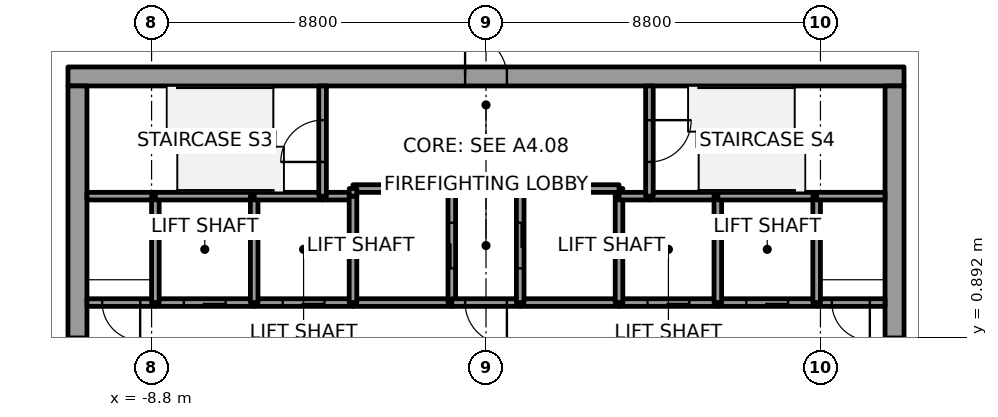
"""IFC4 building model, lengths in metres.
Left out: names, types, materials, properties, quantities, classifications, styles, units other than length and angle.
Written with IfcOpenShell. Run it as: python <this file> out.ifc"""

import sys

from ifc_helpers import new_model, si_unit, direction, frame, frame_2d, origin, place, context, subcontext, project, spatial, rectangle, extrude, element, fill, save


model = new_model("IFC4")
c1 = context("Model", 3, precision=1e-05, world=origin(), true_north=direction((0.0, 1.0)))
c2 = subcontext(c1, "Body", "Model", "MODEL_VIEW")
j1 = project(units=[si_unit("LENGTHUNIT", "METRE"), si_unit("PLANEANGLEUNIT", "RADIAN")], contexts=[c1])
p1 = place(None, origin())
s1 = spatial("IfcSite", under=j1, at=p1, CompositionType="ELEMENT")
p2 = place(p1, origin())
s2 = spatial("IfcBuilding", under=s1, at=p2, CompositionType="ELEMENT")
p3 = place(p2, frame((0.0, 0.0, 40.8)))
s3 = spatial("IfcBuildingStorey", under=s2, at=p3, CompositionType="ELEMENT", Elevation=40.8)
p4 = place(p3, frame((-11.0, 7.75, 0.0), z_axis=(0.0, 0.0, 1.0), x_axis=(1.0, 0.0, 0.0)))
e1 = element("IfcWall", 1, at=p4, inside=s3, PredefinedType="SHEAR", context=c2, shape_type="SweptSolid", body=[
    extrude(rectangle(XDim=22.0, YDim=0.5, at=frame_2d((11.0, 0.0))), origin(), (0.0, 0.0, 1.0), 7.2),
])
p5 = place(p4, frame((10.45, 0.0, 0.0)))
e2 = element("IfcOpeningElement", 2, at=p5, cuts=e1, PredefinedType="OPENING", context=c2, shape_type="SweptSolid", body=[
    extrude(rectangle(XDim=1.1, YDim=2.1, at=frame_2d((0.55, 1.05))), frame((0.0, 0.25, 0.0), z_axis=(0.0, -1.0, 0.0), x_axis=(1.0, 0.0, 0.0)), (0.0, 0.0, 1.0), 0.5),
])
p6 = place(p3, frame((-10.75, -7.5, 0.0), z_axis=(0.0, 0.0, 1.0), x_axis=(0.0, 1.0, 0.0)))
e3 = element("IfcWall", 3, at=p6, inside=s3, PredefinedType="SHEAR", context=c2, shape_type="SweptSolid", body=[
    extrude(rectangle(XDim=15.0, YDim=0.5, at=frame_2d((7.5, 0.0))), origin(), (0.0, 0.0, 1.0), 7.2),
])
p7 = place(p6, frame((6.6, 0.0, 0.0)))
e4 = element("IfcOpeningElement", 4, at=p7, cuts=e3, PredefinedType="OPENING", context=c2, shape_type="SweptSolid", body=[
    extrude(rectangle(XDim=1.8, YDim=2.1, at=frame_2d((0.9, 1.05))), frame((0.0, 0.25, 0.0), z_axis=(0.0, -1.0, 0.0), x_axis=(1.0, 0.0, 0.0)), (0.0, 0.0, 1.0), 0.5),
])
p8 = place(p3, frame((10.75, -7.5, 0.0), z_axis=(0.0, 0.0, 1.0), x_axis=(0.0, 1.0, 0.0)))
e5 = element("IfcWall", 5, at=p8, inside=s3, PredefinedType="SHEAR", context=c2, shape_type="SweptSolid", body=[
    extrude(rectangle(XDim=15.0, YDim=0.5, at=frame_2d((7.5, 0.0))), origin(), (0.0, 0.0, 1.0), 7.2),
])
p9 = place(p8, frame((6.6, 0.0, 0.0)))
e6 = element("IfcOpeningElement", 6, at=p9, cuts=e5, PredefinedType="OPENING", context=c2, shape_type="SweptSolid", body=[
    extrude(rectangle(XDim=1.8, YDim=2.1, at=frame_2d((0.9, 1.05))), frame((0.0, 0.25, 0.0), z_axis=(0.0, -1.0, 0.0), x_axis=(1.0, 0.0, 0.0)), (0.0, 0.0, 1.0), 0.5),
])
p10 = place(p3, frame((-8.7, 1.8, 0.0), z_axis=(0.0, 0.0, 1.0), x_axis=(-1.0, 0.0, 0.0)))
e7 = element("IfcWall", 7, at=p10, inside=s3, PredefinedType="SOLIDWALL", context=c2, shape_type="SweptSolid", body=[
    extrude(rectangle(XDim=1.8, YDim=0.2, at=frame_2d((0.9, 0.0))), origin(), (0.0, 0.0, 1.0), 7.05),
])
p11 = place(p10, frame((0.4, 0.0, 0.0)))
e8 = element("IfcOpeningElement", 8, at=p11, cuts=e7, PredefinedType="OPENING", context=c2, shape_type="SweptSolid", body=[
    extrude(rectangle(XDim=1.0, YDim=2.1, at=frame_2d((0.5, 1.05))), frame((0.0, 0.1, 0.0), z_axis=(0.0, -1.0, 0.0), x_axis=(1.0, 0.0, 0.0)), (0.0, 0.0, 1.0), 0.2),
])
p12 = place(p3, frame((-8.7, 4.6, 0.0), z_axis=(0.0, 0.0, 1.0), x_axis=(-1.0, 0.0, 0.0)))
e9 = element("IfcWall", 9, at=p12, inside=s3, PredefinedType="SOLIDWALL", context=c2, shape_type="SweptSolid", body=[
    extrude(rectangle(XDim=1.8, YDim=0.2, at=frame_2d((0.9, 0.0))), origin(), (0.0, 0.0, 1.0), 7.05),
])
p13 = place(p3, frame((-6.1, 1.8, 0.0), z_axis=(0.0, 0.0, 1.0), x_axis=(-1.0, 0.0, 0.0)))
e10 = element("IfcWall", 10, at=p13, inside=s3, PredefinedType="SOLIDWALL", context=c2, shape_type="SweptSolid", body=[
    extrude(rectangle(XDim=2.6, YDim=0.2, at=frame_2d((1.3, 0.0))), origin(), (0.0, 0.0, 1.0), 7.05),
])
p14 = place(p13, frame((0.75, 0.0, 0.0)))
e11 = element("IfcOpeningElement", 11, at=p14, cuts=e10, PredefinedType="OPENING", context=c2, shape_type="SweptSolid", body=[
    extrude(rectangle(XDim=1.1, YDim=2.1, at=frame_2d((0.55, 1.05))), frame((0.0, 0.1, 0.0), z_axis=(0.0, -1.0, 0.0), x_axis=(1.0, 0.0, 0.0)), (0.0, 0.0, 1.0), 0.2),
])
p15 = place(p3, frame((-8.7, 1.8, 0.0), z_axis=(0.0, 0.0, 1.0), x_axis=(0.0, 1.0, 0.0)))
e12 = element("IfcWall", 12, at=p15, inside=s3, PredefinedType="SOLIDWALL", context=c2, shape_type="SweptSolid", body=[
    extrude(rectangle(XDim=2.8, YDim=0.2, at=frame_2d((1.4, 0.0))), origin(), (0.0, 0.0, 1.0), 7.05),
])
p16 = place(p3, frame((-6.1, 4.6, 0.0), z_axis=(0.0, 0.0, 1.0), x_axis=(-1.0, 0.0, 0.0)))
e13 = element("IfcWall", 13, at=p16, inside=s3, PredefinedType="SOLIDWALL", context=c2, shape_type="SweptSolid", body=[
    extrude(rectangle(XDim=2.6, YDim=0.2, at=frame_2d((1.3, 0.0))), origin(), (0.0, 0.0, 1.0), 7.05),
])
p17 = place(p3, frame((-3.5, 1.8, 0.0), z_axis=(0.0, 0.0, 1.0), x_axis=(-1.0, 0.0, 0.0)))
e14 = element("IfcWall", 14, at=p17, inside=s3, PredefinedType="SOLIDWALL", context=c2, shape_type="SweptSolid", body=[
    extrude(rectangle(XDim=2.6, YDim=0.2, at=frame_2d((1.3, 0.0))), origin(), (0.0, 0.0, 1.0), 7.05),
])
p18 = place(p17, frame((0.75, 0.0, 0.0)))
e15 = element("IfcOpeningElement", 15, at=p18, cuts=e14, PredefinedType="OPENING", context=c2, shape_type="SweptSolid", body=[
    extrude(rectangle(XDim=1.1, YDim=2.1, at=frame_2d((0.55, 1.05))), frame((0.0, 0.1, 0.0), z_axis=(0.0, -1.0, 0.0), x_axis=(1.0, 0.0, 0.0)), (0.0, 0.0, 1.0), 0.2),
])
p19 = place(p3, frame((-6.1, 1.8, 0.0), z_axis=(0.0, 0.0, 1.0), x_axis=(0.0, 1.0, 0.0)))
e16 = element("IfcWall", 16, at=p19, inside=s3, PredefinedType="SOLIDWALL", context=c2, shape_type="SweptSolid", body=[
    extrude(rectangle(XDim=2.8, YDim=0.2, at=frame_2d((1.4, 0.0))), origin(), (0.0, 0.0, 1.0), 7.05),
])
p20 = place(p3, frame((-4.3, 4.6, 0.0), z_axis=(0.0, 0.0, 1.0), x_axis=(-1.0, 0.0, 0.0)))
e17 = element("IfcWall", 17, at=p20, inside=s3, PredefinedType="SOLIDWALL", context=c2, shape_type="SweptSolid", body=[
    extrude(rectangle(XDim=1.8, YDim=0.2, at=frame_2d((0.9, 0.0))), origin(), (0.0, 0.0, 1.0), 7.05),
])
p21 = place(p3, frame((-3.5, 4.6, 0.0), z_axis=(0.0, 0.0, 1.0), x_axis=(-1.0, 0.0, 0.0)))
e18 = element("IfcWall", 18, at=p21, inside=s3, PredefinedType="SOLIDWALL", context=c2, shape_type="SweptSolid", body=[
    extrude(rectangle(XDim=0.8, YDim=0.2, at=frame_2d((0.4, 0.0))), origin(), (0.0, 0.0, 1.0), 7.05),
])
p22 = place(p3, frame((-4.3, 4.6, 0.0), z_axis=(0.0, 0.0, 1.0), x_axis=(0.0, 1.0, 0.0)))
e19 = element("IfcWall", 19, at=p22, inside=s3, PredefinedType="SOLIDWALL", context=c2, shape_type="SweptSolid", body=[
    extrude(rectangle(XDim=2.9, YDim=0.2, at=frame_2d((1.45, 0.0))), origin(), (0.0, 0.0, 1.0), 7.05),
])
p23 = place(p22, frame((0.9, 0.0, 0.0)))
e20 = element("IfcOpeningElement", 20, at=p23, cuts=e19, PredefinedType="OPENING", context=c2, shape_type="SweptSolid", body=[
    extrude(rectangle(XDim=1.1, YDim=2.1, at=frame_2d((0.55, 1.05))), frame((0.0, 0.1, 0.0), z_axis=(0.0, -1.0, 0.0), x_axis=(1.0, 0.0, 0.0)), (0.0, 0.0, 1.0), 0.2),
])
p24 = place(p3, frame((-0.9, 1.8, 0.0), z_axis=(0.0, 0.0, 1.0), x_axis=(-1.0, 0.0, 0.0)))
e21 = element("IfcWall", 21, at=p24, inside=s3, PredefinedType="SOLIDWALL", context=c2, shape_type="SweptSolid", body=[
    extrude(rectangle(XDim=2.6, YDim=0.2, at=frame_2d((1.3, 0.0))), origin(), (0.0, 0.0, 1.0), 7.05),
])
p25 = place(p3, frame((-3.5, 4.6, 0.0), z_axis=(0.0, 0.0, 1.0), x_axis=(0.0, -1.0, 0.0)))
e22 = element("IfcWall", 22, at=p25, inside=s3, PredefinedType="SOLIDWALL", context=c2, shape_type="SweptSolid", body=[
    extrude(rectangle(XDim=2.8, YDim=0.2, at=frame_2d((1.4, 0.0))), origin(), (0.0, 0.0, 1.0), 7.05),
])
p26 = place(p3, frame((-0.9, 1.8, 0.0), z_axis=(0.0, 0.0, 1.0), x_axis=(0.0, 1.0, 0.0)))
e23 = element("IfcWall", 23, at=p26, inside=s3, PredefinedType="SOLIDWALL", context=c2, shape_type="SweptSolid", body=[
    extrude(rectangle(XDim=3.0, YDim=0.2, at=frame_2d((1.5, 0.0))), origin(), (0.0, 0.0, 1.0), 7.05),
])
p27 = place(p26, frame((0.9, 0.0, 0.0)))
e24 = element("IfcOpeningElement", 24, at=p27, cuts=e23, PredefinedType="OPENING", context=c2, shape_type="SweptSolid", body=[
    extrude(rectangle(XDim=1.2, YDim=2.1, at=frame_2d((0.6, 1.05))), frame((0.0, 0.1, 0.0), z_axis=(0.0, -1.0, 0.0), x_axis=(1.0, 0.0, 0.0)), (0.0, 0.0, 1.0), 0.2),
])
p28 = place(p3, frame((-0.9, 4.8, 0.0), z_axis=(0.0, 0.0, 1.0), x_axis=(-1.0, 0.0, 0.0)))
e25 = element("IfcWall", 25, at=p28, inside=s3, PredefinedType="SOLIDWALL", context=c2, shape_type="SweptSolid", body=[
    extrude(rectangle(XDim=2.6, YDim=0.2, at=frame_2d((1.3, 0.0))), origin(), (0.0, 0.0, 1.0), 7.05),
])
p29 = place(p3, frame((-3.5, 4.8, 0.0), z_axis=(0.0, 0.0, 1.0), x_axis=(0.0, -1.0, 0.0)))
e26 = element("IfcWall", 26, at=p29, inside=s3, PredefinedType="SOLIDWALL", context=c2, shape_type="SweptSolid", body=[
    extrude(rectangle(XDim=0.2, YDim=0.2, at=frame_2d((0.1, 0.0))), origin(), (0.0, 0.0, 1.0), 7.05),
])
p30 = place(p3, frame((0.9, 1.8, 0.0), z_axis=(0.0, 0.0, 1.0), x_axis=(-1.0, 0.0, 0.0)))
e27 = element("IfcWall", 27, at=p30, inside=s3, PredefinedType="SOLIDWALL", context=c2, shape_type="SweptSolid", body=[
    extrude(rectangle(XDim=1.8, YDim=0.2, at=frame_2d((0.9, 0.0))), origin(), (0.0, 0.0, 1.0), 7.05),
])
p31 = place(p30, frame((0.35, 0.0, 0.0)))
e28 = element("IfcOpeningElement", 28, at=p31, cuts=e27, PredefinedType="OPENING", context=c2, shape_type="SweptSolid", body=[
    extrude(rectangle(XDim=1.1, YDim=2.1, at=frame_2d((0.55, 1.05))), frame((0.0, 0.1, 0.0), z_axis=(0.0, -1.0, 0.0), x_axis=(1.0, 0.0, 0.0)), (0.0, 0.0, 1.0), 0.2),
])
p32 = place(p3, frame((3.5, 1.8, 0.0), z_axis=(0.0, 0.0, 1.0), x_axis=(-1.0, 0.0, 0.0)))
e29 = element("IfcWall", 29, at=p32, inside=s3, PredefinedType="SOLIDWALL", context=c2, shape_type="SweptSolid", body=[
    extrude(rectangle(XDim=2.6, YDim=0.2, at=frame_2d((1.3, 0.0))), origin(), (0.0, 0.0, 1.0), 7.05),
])
p33 = place(p3, frame((3.5, 4.6, 0.0), z_axis=(0.0, 0.0, 1.0), x_axis=(0.0, 1.0, 0.0)))
e30 = element("IfcWall", 30, at=p33, inside=s3, PredefinedType="SOLIDWALL", context=c2, shape_type="SweptSolid", body=[
    extrude(rectangle(XDim=0.2, YDim=0.2, at=frame_2d((0.1, 0.0))), origin(), (0.0, 0.0, 1.0), 7.05),
])
p34 = place(p3, frame((3.5, 4.8, 0.0), z_axis=(0.0, 0.0, 1.0), x_axis=(-1.0, 0.0, 0.0)))
e31 = element("IfcWall", 31, at=p34, inside=s3, PredefinedType="SOLIDWALL", context=c2, shape_type="SweptSolid", body=[
    extrude(rectangle(XDim=2.6, YDim=0.2, at=frame_2d((1.3, 0.0))), origin(), (0.0, 0.0, 1.0), 7.05),
])
p35 = place(p3, frame((0.9, 4.8, 0.0), z_axis=(0.0, 0.0, 1.0), x_axis=(0.0, -1.0, 0.0)))
e32 = element("IfcWall", 32, at=p35, inside=s3, PredefinedType="SOLIDWALL", context=c2, shape_type="SweptSolid", body=[
    extrude(rectangle(XDim=3.0, YDim=0.2, at=frame_2d((1.5, 0.0))), origin(), (0.0, 0.0, 1.0), 7.05),
])
p36 = place(p35, frame((0.9, 0.0, 0.0)))
e33 = element("IfcOpeningElement", 33, at=p36, cuts=e32, PredefinedType="OPENING", context=c2, shape_type="SweptSolid", body=[
    extrude(rectangle(XDim=1.2, YDim=2.1, at=frame_2d((0.6, 1.05))), frame((0.0, 0.1, 0.0), z_axis=(0.0, -1.0, 0.0), x_axis=(1.0, 0.0, 0.0)), (0.0, 0.0, 1.0), 0.2),
])
p37 = place(p3, frame((6.1, 1.8, 0.0), z_axis=(0.0, 0.0, 1.0), x_axis=(-1.0, 0.0, 0.0)))
e34 = element("IfcWall", 34, at=p37, inside=s3, PredefinedType="SOLIDWALL", context=c2, shape_type="SweptSolid", body=[
    extrude(rectangle(XDim=2.6, YDim=0.2, at=frame_2d((1.3, 0.0))), origin(), (0.0, 0.0, 1.0), 7.05),
])
p38 = place(p37, frame((0.75, 0.0, 0.0)))
e35 = element("IfcOpeningElement", 35, at=p38, cuts=e34, PredefinedType="OPENING", context=c2, shape_type="SweptSolid", body=[
    extrude(rectangle(XDim=1.1, YDim=2.1, at=frame_2d((0.55, 1.05))), frame((0.0, 0.1, 0.0), z_axis=(0.0, -1.0, 0.0), x_axis=(1.0, 0.0, 0.0)), (0.0, 0.0, 1.0), 0.2),
])
p39 = place(p3, frame((3.5, 1.8, 0.0), z_axis=(0.0, 0.0, 1.0), x_axis=(0.0, 1.0, 0.0)))
e36 = element("IfcWall", 36, at=p39, inside=s3, PredefinedType="SOLIDWALL", context=c2, shape_type="SweptSolid", body=[
    extrude(rectangle(XDim=2.8, YDim=0.2, at=frame_2d((1.4, 0.0))), origin(), (0.0, 0.0, 1.0), 7.05),
])
p40 = place(p3, frame((4.3, 4.6, 0.0), z_axis=(0.0, 0.0, 1.0), x_axis=(-1.0, 0.0, 0.0)))
e37 = element("IfcWall", 37, at=p40, inside=s3, PredefinedType="SOLIDWALL", context=c2, shape_type="SweptSolid", body=[
    extrude(rectangle(XDim=0.8, YDim=0.2, at=frame_2d((0.4, 0.0))), origin(), (0.0, 0.0, 1.0), 7.05),
])
p41 = place(p3, frame((6.1, 4.6, 0.0), z_axis=(0.0, 0.0, 1.0), x_axis=(-1.0, 0.0, 0.0)))
e38 = element("IfcWall", 38, at=p41, inside=s3, PredefinedType="SOLIDWALL", context=c2, shape_type="SweptSolid", body=[
    extrude(rectangle(XDim=1.8, YDim=0.2, at=frame_2d((0.9, 0.0))), origin(), (0.0, 0.0, 1.0), 7.05),
])
p42 = place(p3, frame((4.3, 7.5, 0.0), z_axis=(0.0, 0.0, 1.0), x_axis=(0.0, -1.0, 0.0)))
e39 = element("IfcWall", 39, at=p42, inside=s3, PredefinedType="SOLIDWALL", context=c2, shape_type="SweptSolid", body=[
    extrude(rectangle(XDim=2.9, YDim=0.2, at=frame_2d((1.45, 0.0))), origin(), (0.0, 0.0, 1.0), 7.05),
])
p43 = place(p42, frame((0.9, 0.0, 0.0)))
e40 = element("IfcOpeningElement", 40, at=p43, cuts=e39, PredefinedType="OPENING", context=c2, shape_type="SweptSolid", body=[
    extrude(rectangle(XDim=1.1, YDim=2.1, at=frame_2d((0.55, 1.05))), frame((0.0, 0.1, 0.0), z_axis=(0.0, -1.0, 0.0), x_axis=(1.0, 0.0, 0.0)), (0.0, 0.0, 1.0), 0.2),
])
p44 = place(p3, frame((8.7, 1.8, 0.0), z_axis=(0.0, 0.0, 1.0), x_axis=(-1.0, 0.0, 0.0)))
e41 = element("IfcWall", 41, at=p44, inside=s3, PredefinedType="SOLIDWALL", context=c2, shape_type="SweptSolid", body=[
    extrude(rectangle(XDim=2.6, YDim=0.2, at=frame_2d((1.3, 0.0))), origin(), (0.0, 0.0, 1.0), 7.05),
])
p45 = place(p44, frame((0.75, 0.0, 0.0)))
e42 = element("IfcOpeningElement", 42, at=p45, cuts=e41, PredefinedType="OPENING", context=c2, shape_type="SweptSolid", body=[
    extrude(rectangle(XDim=1.1, YDim=2.1, at=frame_2d((0.55, 1.05))), frame((0.0, 0.1, 0.0), z_axis=(0.0, -1.0, 0.0), x_axis=(1.0, 0.0, 0.0)), (0.0, 0.0, 1.0), 0.2),
])
p46 = place(p3, frame((6.1, 1.8, 0.0), z_axis=(0.0, 0.0, 1.0), x_axis=(0.0, 1.0, 0.0)))
e43 = element("IfcWall", 43, at=p46, inside=s3, PredefinedType="SOLIDWALL", context=c2, shape_type="SweptSolid", body=[
    extrude(rectangle(XDim=2.8, YDim=0.2, at=frame_2d((1.4, 0.0))), origin(), (0.0, 0.0, 1.0), 7.05),
])
p47 = place(p3, frame((8.7, 4.6, 0.0), z_axis=(0.0, 0.0, 1.0), x_axis=(-1.0, 0.0, 0.0)))
e44 = element("IfcWall", 44, at=p47, inside=s3, PredefinedType="SOLIDWALL", context=c2, shape_type="SweptSolid", body=[
    extrude(rectangle(XDim=2.6, YDim=0.2, at=frame_2d((1.3, 0.0))), origin(), (0.0, 0.0, 1.0), 7.05),
])
p48 = place(p3, frame((10.5, 1.8, 0.0), z_axis=(0.0, 0.0, 1.0), x_axis=(-1.0, 0.0, 0.0)))
e45 = element("IfcWall", 45, at=p48, inside=s3, PredefinedType="SOLIDWALL", context=c2, shape_type="SweptSolid", body=[
    extrude(rectangle(XDim=1.8, YDim=0.2, at=frame_2d((0.9, 0.0))), origin(), (0.0, 0.0, 1.0), 7.05),
])
p49 = place(p48, frame((0.4, 0.0, 0.0)))
e46 = element("IfcOpeningElement", 46, at=p49, cuts=e45, PredefinedType="OPENING", context=c2, shape_type="SweptSolid", body=[
    extrude(rectangle(XDim=1.0, YDim=2.1, at=frame_2d((0.5, 1.05))), frame((0.0, 0.1, 0.0), z_axis=(0.0, -1.0, 0.0), x_axis=(1.0, 0.0, 0.0)), (0.0, 0.0, 1.0), 0.2),
])
p50 = place(p3, frame((8.7, 4.6, 0.0), z_axis=(0.0, 0.0, 1.0), x_axis=(0.0, -1.0, 0.0)))
e47 = element("IfcWall", 47, at=p50, inside=s3, PredefinedType="SOLIDWALL", context=c2, shape_type="SweptSolid", body=[
    extrude(rectangle(XDim=2.8, YDim=0.2, at=frame_2d((1.4, 0.0))), origin(), (0.0, 0.0, 1.0), 7.05),
])
p51 = place(p3, frame((10.5, 4.6, 0.0), z_axis=(0.0, 0.0, 1.0), x_axis=(-1.0, 0.0, 0.0)))
e48 = element("IfcWall", 48, at=p51, inside=s3, PredefinedType="SOLIDWALL", context=c2, shape_type="SweptSolid", body=[
    extrude(rectangle(XDim=1.8, YDim=0.2, at=frame_2d((0.9, 0.0))), origin(), (0.0, 0.0, 1.0), 7.05),
])
p52 = place(p14, origin())
e49 = element("IfcDoor", 49, at=p52, inside=s3, OperationType="SLIDING_TO_RIGHT", PredefinedType="DOOR", context=c2, shape_type="SweptSolid", body=[
    extrude(rectangle(XDim=1.1, YDim=2.1, at=frame_2d((0.55, 1.05))), frame((0.0, 0.025, 0.0), z_axis=(0.0, -1.0, 0.0), x_axis=(1.0, 0.0, 0.0)), (0.0, 0.0, 1.0), 0.05),
])
fill(e11, e49)
p53 = place(p18, origin())
e50 = element("IfcDoor", 50, at=p53, inside=s3, OperationType="SLIDING_TO_LEFT", PredefinedType="DOOR", context=c2, shape_type="SweptSolid", body=[
    extrude(rectangle(XDim=1.1, YDim=2.1, at=frame_2d((0.55, 1.05))), frame((0.0, 0.025, 0.0), z_axis=(0.0, -1.0, 0.0), x_axis=(1.0, 0.0, 0.0)), (0.0, 0.0, 1.0), 0.05),
])
fill(e15, e50)
p54 = place(p38, origin())
e51 = element("IfcDoor", 51, at=p54, inside=s3, OperationType="SLIDING_TO_RIGHT", PredefinedType="DOOR", context=c2, shape_type="SweptSolid", body=[
    extrude(rectangle(XDim=1.1, YDim=2.1, at=frame_2d((0.55, 1.05))), frame((0.0, 0.025, 0.0), z_axis=(0.0, -1.0, 0.0), x_axis=(1.0, 0.0, 0.0)), (0.0, 0.0, 1.0), 0.05),
])
fill(e35, e51)
p55 = place(p45, origin())
e52 = element("IfcDoor", 52, at=p55, inside=s3, OperationType="SLIDING_TO_LEFT", PredefinedType="DOOR", context=c2, shape_type="SweptSolid", body=[
    extrude(rectangle(XDim=1.1, YDim=2.1, at=frame_2d((0.55, 1.05))), frame((0.0, 0.025, 0.0), z_axis=(0.0, -1.0, 0.0), x_axis=(1.0, 0.0, 0.0)), (0.0, 0.0, 1.0), 0.05),
])
fill(e42, e52)
p56 = place(p27, origin())
e53 = element("IfcDoor", 53, at=p56, inside=s3, OperationType="SLIDING_TO_RIGHT", PredefinedType="DOOR", context=c2, shape_type="SweptSolid", body=[
    extrude(rectangle(XDim=1.2, YDim=2.1, at=frame_2d((0.6, 1.05))), frame((0.0, 0.025, 0.0), z_axis=(0.0, -1.0, 0.0), x_axis=(1.0, 0.0, 0.0)), (0.0, 0.0, 1.0), 0.05),
])
fill(e24, e53)
p57 = place(p36, origin())
e54 = element("IfcDoor", 54, at=p57, inside=s3, OperationType="SLIDING_TO_LEFT", PredefinedType="DOOR", context=c2, shape_type="SweptSolid", body=[
    extrude(rectangle(XDim=1.2, YDim=2.1, at=frame_2d((0.6, 1.05))), frame((0.0, 0.025, 0.0), z_axis=(0.0, -1.0, 0.0), x_axis=(1.0, 0.0, 0.0)), (0.0, 0.0, 1.0), 0.05),
])
fill(e33, e54)
p58 = place(p31, origin())
e55 = element("IfcDoor", 55, at=p58, inside=s3, OperationType="SINGLE_SWING_RIGHT", PredefinedType="DOOR", context=c2, shape_type="SweptSolid", body=[
    extrude(rectangle(XDim=1.1, YDim=2.1, at=frame_2d((0.55, 1.05))), frame((0.0, 0.025, 0.0), z_axis=(0.0, -1.0, 0.0), x_axis=(1.0, 0.0, 0.0)), (0.0, 0.0, 1.0), 0.05),
])
fill(e28, e55)
p59 = place(p11, origin())
e56 = element("IfcDoor", 56, at=p59, inside=s3, OperationType="SINGLE_SWING_LEFT", PredefinedType="DOOR", context=c2, shape_type="SweptSolid", body=[
    extrude(rectangle(XDim=1.0, YDim=2.1, at=frame_2d((0.5, 1.05))), frame((0.0, 0.025, 0.0), z_axis=(0.0, -1.0, 0.0), x_axis=(1.0, 0.0, 0.0)), (0.0, 0.0, 1.0), 0.05),
])
fill(e8, e56)
p60 = place(p49, origin())
e57 = element("IfcDoor", 57, at=p60, inside=s3, OperationType="SINGLE_SWING_LEFT", PredefinedType="DOOR", context=c2, shape_type="SweptSolid", body=[
    extrude(rectangle(XDim=1.0, YDim=2.1, at=frame_2d((0.5, 1.05))), frame((0.0, 0.025, 0.0), z_axis=(0.0, -1.0, 0.0), x_axis=(1.0, 0.0, 0.0)), (0.0, 0.0, 1.0), 0.05),
])
fill(e46, e57)
p61 = place(p23, origin())
e58 = element("IfcDoor", 58, at=p61, inside=s3, OperationType="SINGLE_SWING_RIGHT", PredefinedType="DOOR", context=c2, shape_type="SweptSolid", body=[
    extrude(rectangle(XDim=1.1, YDim=2.1, at=frame_2d((0.55, 1.05))), frame((0.0, 0.025, 0.0), z_axis=(0.0, -1.0, 0.0), x_axis=(1.0, 0.0, 0.0)), (0.0, 0.0, 1.0), 0.05),
])
fill(e20, e58)
p62 = place(p43, origin())
e59 = element("IfcDoor", 59, at=p62, inside=s3, OperationType="SINGLE_SWING_LEFT", PredefinedType="DOOR", context=c2, shape_type="SweptSolid", body=[
    extrude(rectangle(XDim=1.1, YDim=2.1, at=frame_2d((0.55, 1.05))), frame((0.0, 0.025, 0.0), z_axis=(0.0, -1.0, 0.0), x_axis=(1.0, 0.0, 0.0)), (0.0, 0.0, 1.0), 0.05),
])
fill(e40, e59)
p63 = place(p7, origin())
e60 = element("IfcDoor", 60, at=p63, inside=s3, OperationType="DOUBLE_DOOR_SINGLE_SWING", PredefinedType="DOOR", context=c2, shape_type="SweptSolid", body=[
    extrude(rectangle(XDim=1.8, YDim=2.1, at=frame_2d((0.9, 1.05))), frame((0.0, 0.025, 0.0), z_axis=(0.0, -1.0, 0.0), x_axis=(1.0, 0.0, 0.0)), (0.0, 0.0, 1.0), 0.05),
])
fill(e4, e60)
p64 = place(p9, origin())
e61 = element("IfcDoor", 61, at=p64, inside=s3, OperationType="DOUBLE_DOOR_SINGLE_SWING", PredefinedType="DOOR", context=c2, shape_type="SweptSolid", body=[
    extrude(rectangle(XDim=1.8, YDim=2.1, at=frame_2d((0.9, 1.05))), frame((0.0, 0.025, 0.0), z_axis=(0.0, -1.0, 0.0), x_axis=(1.0, 0.0, 0.0)), (0.0, 0.0, 1.0), 0.05),
])
fill(e6, e61)
p65 = place(p5, origin())
e62 = element("IfcDoor", 62, at=p65, inside=s3, OperationType="SINGLE_SWING_LEFT", PredefinedType="DOOR", context=c2, shape_type="SweptSolid", body=[
    extrude(rectangle(XDim=1.1, YDim=2.1, at=frame_2d((0.55, 1.05))), frame((0.0, 0.025, 0.0), z_axis=(0.0, -1.0, 0.0), x_axis=(1.0, 0.0, 0.0)), (0.0, 0.0, 1.0), 0.05),
])
fill(e2, e62)
save(model, sys.argv[1])
